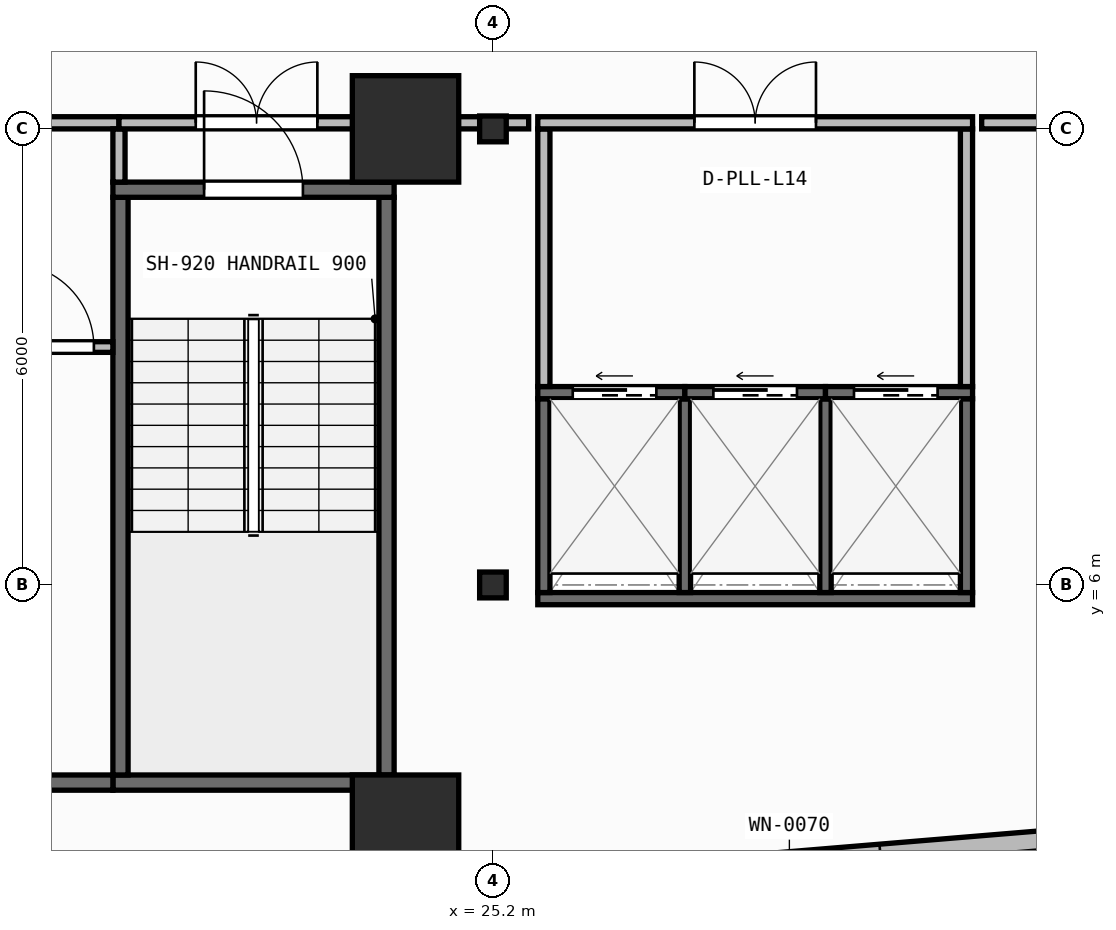
"""IFC4 building model, lengths in metres.
Left out: names, types, materials, properties, quantities, classifications, styles, units other than length and angle.
Written with IfcOpenShell. Run it as: python <this file> out.ifc"""

import sys

from ifc_helpers import new_model, si_unit, direction, frame, frame_2d, origin, origin_2d, place, context, subcontext, project, spatial, rectangle, i_section, extrude, element, fill, save


model = new_model("IFC4")
c1 = context("Model", 3, precision=1e-05, world=origin(), true_north=direction((0.0, 1.0)))
c2 = subcontext(c1, "Body", "Model", "MODEL_VIEW")
j1 = project(units=[si_unit("LENGTHUNIT", "METRE"), si_unit("PLANEANGLEUNIT", "RADIAN")], contexts=[c1])
p1 = place(None, origin())
s1 = spatial("IfcSite", under=j1, at=p1, CompositionType="ELEMENT")
p2 = place(p1, origin())
s2 = spatial("IfcBuilding", under=s1, at=p2, CompositionType="ELEMENT")
p3 = place(p2, frame((0.0, 0.0, 58.05)))
s3 = spatial("IfcBuildingStorey", under=s2, at=p3, CompositionType="ELEMENT", Elevation=58.05)
p4 = place(p3, frame((24.05, 2.8, 0.0), z_axis=(0.0, 0.0, 1.0), x_axis=(1.0, 0.0, 0.0)))
e1 = element("IfcColumn", 1, at=p4, inside=s3, PredefinedType="COLUMN", context=c2, shape_type="SweptSolid", body=[
    extrude(rectangle(XDim=1.4, YDim=1.4, at=origin_2d()), origin(), (0.0, 0.0, 1.0), 3.95),
])
p5 = place(p3, frame((25.2, 6.0, 0.0), z_axis=(0.0, 0.0, 1.0), x_axis=(1.0, 0.0, 0.0)))
e2 = element("IfcColumn", 2, at=p5, inside=s3, PredefinedType="COLUMN", context=c2, shape_type="SweptSolid", body=[
    extrude(i_section(OverallWidth=0.35, OverallDepth=0.34, WebThickness=0.016, FlangeThickness=0.028, at=origin_2d()), origin(), (0.0, 0.0, 1.0), 3.95),
])
p6 = place(p3, frame((24.05, 12.0, 0.0), z_axis=(0.0, 0.0, 1.0), x_axis=(1.0, 0.0, 0.0)))
e3 = element("IfcColumn", 3, at=p6, inside=s3, PredefinedType="COLUMN", context=c2, shape_type="SweptSolid", body=[
    extrude(rectangle(XDim=1.4, YDim=1.4, at=origin_2d()), origin(), (0.0, 0.0, 1.0), 3.95),
])
p7 = place(p3, frame((25.2, 12.0, 0.0), z_axis=(0.0, 0.0, 1.0), x_axis=(1.0, 0.0, 0.0)))
e4 = element("IfcColumn", 4, at=p7, inside=s3, PredefinedType="COLUMN", context=c2, shape_type="SweptSolid", body=[
    extrude(i_section(OverallWidth=0.35, OverallDepth=0.34, WebThickness=0.016, FlangeThickness=0.028, at=origin_2d()), origin(), (0.0, 0.0, 1.0), 3.95),
])
p8 = place(p3, frame((2.76, 0.174, 0.0), z_axis=(0.0, 0.0, 1.0), x_axis=(0.996571478456, 0.082736257641, 0.0)))
e5 = element("IfcWall", 5, at=p8, inside=s3, PredefinedType="STANDARD", context=c2, shape_type="SweptSolid", body=[
    extrude(rectangle(XDim=52.861, YDim=0.26, at=frame_2d((26.431, 0.0))), origin(), (0.0, 0.0, 1.0), 3.71),
])
p9 = place(p8, frame((25.231, 0.0, 0.9)))
e6 = element("IfcOpeningElement", 6, at=p9, cuts=e5, PredefinedType="OPENING", context=c2, shape_type="SweptSolid", body=[
    extrude(rectangle(XDim=2.4, YDim=1.65, at=frame_2d((1.2, 0.825))), frame((0.0, 0.14, 0.0), z_axis=(0.0, -1.0, 0.0), x_axis=(1.0, 0.0, 0.0)), (0.0, 0.0, 1.0), 0.28),
])
p10 = place(p3, frame((20.2, 3.4, 0.0), z_axis=(0.0, 0.0, 1.0), x_axis=(1.0, 0.0, 0.0)))
e7 = element("IfcWall", 7, at=p10, inside=s3, PredefinedType="SHEAR", context=c2, shape_type="SweptSolid", body=[
    extrude(rectangle(XDim=3.7, YDim=0.2, at=frame_2d((1.85, 0.0))), origin(), (0.0, 0.0, 1.0), 3.71),
])
for number, where, z_axis, x_axis in (
    (8, (20.3, 3.5, 0.0), (0.0, 0.0, 1.0), (0.0, 1.0, 0.0)),
    (9, (23.8, 3.5, 0.0), (0.0, 0.0, 1.0), (0.0, 1.0, 0.0)),
):
    element("IfcWall", number, at=place(p3, frame(where, z_axis=z_axis, x_axis=x_axis)), inside=s3, PredefinedType="SHEAR", context=c2, shape_type="SweptSolid", body=[
        extrude(rectangle(XDim=7.6, YDim=0.2, at=frame_2d((3.8, 0.0))), origin(), (0.0, 0.0, 1.0), 3.71),
    ])
p11 = place(p3, frame((20.2, 11.2, 0.0), z_axis=(0.0, 0.0, 1.0), x_axis=(1.0, 0.0, 0.0)))
e10 = element("IfcWall", 10, at=p11, inside=s3, PredefinedType="SHEAR", context=c2, shape_type="SweptSolid", body=[
    extrude(rectangle(XDim=3.7, YDim=0.2, at=frame_2d((1.85, 0.0))), origin(), (0.0, 0.0, 1.0), 3.71),
])
p12 = place(p11, frame((1.2, 0.0, 0.0)))
e11 = element("IfcOpeningElement", 11, at=p12, cuts=e10, PredefinedType="OPENING", context=c2, shape_type="SweptSolid", body=[
    extrude(rectangle(XDim=1.3, YDim=2.15, at=frame_2d((0.65, 1.075))), frame((0.0, 0.11, 0.0), z_axis=(0.0, -1.0, 0.0), x_axis=(1.0, 0.0, 0.0)), (0.0, 0.0, 1.0), 0.22),
])
p13 = place(p3, frame((6.5, 3.4, 0.0), z_axis=(0.0, 0.0, 1.0), x_axis=(1.0, 0.0, 0.0)))
e12 = element("IfcWall", 12, at=p13, inside=s3, PredefinedType="SHEAR", context=c2, shape_type="SweptSolid", body=[
    extrude(rectangle(XDim=13.7, YDim=0.2, at=frame_2d((6.85, 0.0))), origin(), (0.0, 0.0, 1.0), 3.71),
])
p14 = place(p3, frame((25.79, 5.82, 0.0), z_axis=(0.0, 0.0, 1.0), x_axis=(1.0, 0.0, 0.0)))
e13 = element("IfcWall", 13, at=p14, inside=s3, PredefinedType="SHEAR", context=c2, shape_type="SweptSolid", body=[
    extrude(rectangle(XDim=5.72, YDim=0.16, at=frame_2d((2.86, 0.0))), origin(), (0.0, 0.0, 1.0), 3.71),
])
for number, where, z_axis, x_axis in (
    (14, (25.87, 5.9, 0.0), (0.0, 0.0, 1.0), (0.0, 1.0, 0.0)),
    (15, (31.43, 5.9, 0.0), (0.0, 0.0, 1.0), (0.0, 1.0, 0.0)),
):
    element("IfcWall", number, at=place(p3, frame(where, z_axis=z_axis, x_axis=x_axis)), inside=s3, PredefinedType="SHEAR", context=c2, shape_type="SweptSolid", body=[
        extrude(rectangle(XDim=2.55, YDim=0.16, at=frame_2d((1.275, 0.0))), origin(), (0.0, 0.0, 1.0), 3.71),
    ])
for number, where, z_axis, x_axis in (
    (16, (27.725, 5.9, 0.0), (0.0, 0.0, 1.0), (0.0, 1.0, 0.0)),
    (17, (29.575, 5.9, 0.0), (0.0, 0.0, 1.0), (0.0, 1.0, 0.0)),
):
    element("IfcWall", number, at=place(p3, frame(where, z_axis=z_axis, x_axis=x_axis)), inside=s3, PredefinedType="SHEAR", context=c2, shape_type="SweptSolid", body=[
        extrude(rectangle(XDim=2.55, YDim=0.15, at=frame_2d((1.275, 0.0))), origin(), (0.0, 0.0, 1.0), 3.71),
    ])
p15 = place(p3, frame((25.79, 8.53, 0.0), z_axis=(0.0, 0.0, 1.0), x_axis=(1.0, 0.0, 0.0)))
e18 = element("IfcWall", 18, at=p15, inside=s3, PredefinedType="SHEAR", context=c2, shape_type="SweptSolid", body=[
    extrude(rectangle(XDim=1.935, YDim=0.16, at=frame_2d((0.968, 0.0))), origin(), (0.0, 0.0, 1.0), 3.71),
])
p16 = place(p15, frame((0.46, 0.0, 0.0)))
e19 = element("IfcOpeningElement", 19, at=p16, cuts=e18, PredefinedType="OPENING", context=c2, shape_type="SweptSolid", body=[
    extrude(rectangle(XDim=1.1, YDim=2.15, at=frame_2d((0.55, 1.075))), frame((0.0, 0.09, 0.0), z_axis=(0.0, -1.0, 0.0), x_axis=(1.0, 0.0, 0.0)), (0.0, 0.0, 1.0), 0.18),
])
p17 = place(p3, frame((27.725, 8.53, 0.0), z_axis=(0.0, 0.0, 1.0), x_axis=(1.0, 0.0, 0.0)))
e20 = element("IfcWall", 20, at=p17, inside=s3, PredefinedType="SHEAR", context=c2, shape_type="SweptSolid", body=[
    extrude(rectangle(XDim=1.85, YDim=0.16, at=frame_2d((0.925, 0.0))), origin(), (0.0, 0.0, 1.0), 3.71),
])
p18 = place(p17, frame((0.375, 0.0, 0.0)))
e21 = element("IfcOpeningElement", 21, at=p18, cuts=e20, PredefinedType="OPENING", context=c2, shape_type="SweptSolid", body=[
    extrude(rectangle(XDim=1.1, YDim=2.15, at=frame_2d((0.55, 1.075))), frame((0.0, 0.09, 0.0), z_axis=(0.0, -1.0, 0.0), x_axis=(1.0, 0.0, 0.0)), (0.0, 0.0, 1.0), 0.18),
])
p19 = place(p3, frame((29.575, 8.53, 0.0), z_axis=(0.0, 0.0, 1.0), x_axis=(1.0, 0.0, 0.0)))
e22 = element("IfcWall", 22, at=p19, inside=s3, PredefinedType="SHEAR", context=c2, shape_type="SweptSolid", body=[
    extrude(rectangle(XDim=1.935, YDim=0.16, at=frame_2d((0.968, 0.0))), origin(), (0.0, 0.0, 1.0), 3.71),
])
p20 = place(p19, frame((0.375, 0.0, 0.0)))
e23 = element("IfcOpeningElement", 23, at=p20, cuts=e22, PredefinedType="OPENING", context=c2, shape_type="SweptSolid", body=[
    extrude(rectangle(XDim=1.1, YDim=2.15, at=frame_2d((0.55, 1.075))), frame((0.0, 0.09, 0.0), z_axis=(0.0, -1.0, 0.0), x_axis=(1.0, 0.0, 0.0)), (0.0, 0.0, 1.0), 0.18),
])
p21 = place(p3, frame((18.61, 9.13, 0.0), z_axis=(0.0, 0.0, 1.0), x_axis=(1.0, 0.0, 0.0)))
e24 = element("IfcWall", 24, at=p21, inside=s3, PredefinedType="PARTITIONING", context=c2, shape_type="SweptSolid", body=[
    extrude(rectangle(XDim=1.59, YDim=0.14, at=frame_2d((0.795, 0.0))), origin(), (0.0, 0.0, 1.0), 3.71),
])
p22 = place(p21, frame((0.24, 0.0, 0.0)))
e25 = element("IfcOpeningElement", 25, at=p22, cuts=e24, PredefinedType="OPENING", context=c2, shape_type="SweptSolid", body=[
    extrude(rectangle(XDim=1.1, YDim=2.1, at=frame_2d((0.55, 1.05))), frame((0.0, 0.08, 0.0), z_axis=(0.0, -1.0, 0.0), x_axis=(1.0, 0.0, 0.0)), (0.0, 0.0, 1.0), 0.16),
])
p23 = place(p3, frame((12.58, 12.08, 0.0), z_axis=(0.0, 0.0, 1.0), x_axis=(1.0, 0.0, 0.0)))
e26 = element("IfcWall", 26, at=p23, inside=s3, PredefinedType="PARTITIONING", context=c2, shape_type="SweptSolid", body=[
    extrude(rectangle(XDim=7.7, YDim=0.16, at=frame_2d((3.85, 0.0))), origin(), (0.0, 0.0, 1.0), 3.073),
])
p24 = place(p23, frame((3.05, 0.0, 0.0)))
e27 = element("IfcOpeningElement", 27, at=p24, cuts=e26, PredefinedType="OPENING", context=c2, shape_type="SweptSolid", body=[
    extrude(rectangle(XDim=1.6, YDim=2.05, at=frame_2d((0.8, 1.025))), frame((0.0, 0.09, 0.0), z_axis=(0.0, -1.0, 0.0), x_axis=(1.0, 0.0, 0.0)), (0.0, 0.0, 1.0), 0.18),
])
p25 = place(p3, frame((20.28, 11.3, 0.0), z_axis=(0.0, 0.0, 1.0), x_axis=(0.0, 1.0, 0.0)))
e28 = element("IfcWall", 28, at=p25, inside=s3, PredefinedType="PARTITIONING", context=c2, shape_type="SweptSolid", body=[
    extrude(rectangle(XDim=0.7, YDim=0.16, at=frame_2d((0.35, 0.0))), origin(), (0.0, 0.0, 1.0), 3.71),
])
p26 = place(p3, frame((20.28, 12.08, 0.0), z_axis=(0.0, 0.0, 1.0), x_axis=(1.0, 0.0, 0.0)))
e29 = element("IfcWall", 29, at=p26, inside=s3, PredefinedType="PARTITIONING", context=c2, shape_type="SweptSolid", body=[
    extrude(rectangle(XDim=3.62, YDim=0.16, at=frame_2d((1.81, 0.0))), origin(), (0.0, 0.0, 1.0), 3.073),
])
p27 = place(p26, frame((1.01, 0.0, 0.0)))
e30 = element("IfcOpeningElement", 30, at=p27, cuts=e29, PredefinedType="OPENING", context=c2, shape_type="SweptSolid", body=[
    extrude(rectangle(XDim=1.6, YDim=2.05, at=frame_2d((0.8, 1.025))), frame((0.0, 0.09, 0.0), z_axis=(0.0, -1.0, 0.0), x_axis=(1.0, 0.0, 0.0)), (0.0, 0.0, 1.0), 0.18),
])
p28 = place(p3, frame((23.82, 11.3, 0.0), z_axis=(0.0, 0.0, 1.0), x_axis=(0.0, 1.0, 0.0)))
e31 = element("IfcWall", 31, at=p28, inside=s3, PredefinedType="PARTITIONING", context=c2, shape_type="SweptSolid", body=[
    extrude(rectangle(XDim=0.7, YDim=0.16, at=frame_2d((0.35, 0.0))), origin(), (0.0, 0.0, 1.0), 3.71),
])
for number, where, z_axis, x_axis in (
    (32, (25.87, 8.61, 0.0), (0.0, 0.0, 1.0), (0.0, 1.0, 0.0)),
    (33, (31.43, 8.61, 0.0), (0.0, 0.0, 1.0), (0.0, 1.0, 0.0)),
):
    element("IfcWall", number, at=place(p3, frame(where, z_axis=z_axis, x_axis=x_axis)), inside=s3, PredefinedType="PARTITIONING", context=c2, shape_type="SweptSolid", body=[
        extrude(rectangle(XDim=3.39, YDim=0.16, at=frame_2d((1.695, 0.0))), origin(), (0.0, 0.0, 1.0), 3.71),
    ])
p29 = place(p3, frame((25.79, 12.08, 0.0), z_axis=(0.0, 0.0, 1.0), x_axis=(1.0, 0.0, 0.0)))
e34 = element("IfcWall", 34, at=p29, inside=s3, PredefinedType="PARTITIONING", context=c2, shape_type="SweptSolid", body=[
    extrude(rectangle(XDim=5.72, YDim=0.16, at=frame_2d((2.86, 0.0))), origin(), (0.0, 0.0, 1.0), 3.073),
])
p30 = place(p29, frame((2.06, 0.0, 0.0)))
e35 = element("IfcOpeningElement", 35, at=p30, cuts=e34, PredefinedType="OPENING", context=c2, shape_type="SweptSolid", body=[
    extrude(rectangle(XDim=1.6, YDim=2.05, at=frame_2d((0.8, 1.025))), frame((0.0, 0.09, 0.0), z_axis=(0.0, -1.0, 0.0), x_axis=(1.0, 0.0, 0.0)), (0.0, 0.0, 1.0), 0.18),
])
p31 = place(p3, frame((24.02, 12.08, 0.0), z_axis=(0.0, 0.0, 1.0), x_axis=(1.0, 0.0, 0.0)))
e36 = element("IfcWall", 36, at=p31, inside=s3, PredefinedType="PARTITIONING", context=c2, shape_type="SweptSolid", body=[
    extrude(rectangle(XDim=1.65, YDim=0.16, at=frame_2d((0.825, 0.0))), origin(), (0.0, 0.0, 1.0), 3.073),
])
p32 = place(p3, frame((31.63, 12.08, 0.0), z_axis=(0.0, 0.0, 1.0), x_axis=(1.0, 0.0, 0.0)))
e37 = element("IfcWall", 37, at=p32, inside=s3, PredefinedType="PARTITIONING", context=c2, shape_type="SweptSolid", body=[
    extrude(rectangle(XDim=11.181, YDim=0.16, at=frame_2d((5.59, 0.0))), origin(), (0.0, 0.0, 1.0), 3.073),
])
p33 = place(p12, origin())
e38 = element("IfcDoor", 38, at=p33, inside=s3, OperationType="SINGLE_SWING_LEFT", PredefinedType="DOOR", context=c2, shape_type="SweptSolid", body=[
    extrude(rectangle(XDim=1.3, YDim=2.15, at=frame_2d((0.65, 1.075))), frame((0.0, 0.025, 0.0), z_axis=(0.0, -1.0, 0.0), x_axis=(1.0, 0.0, 0.0)), (0.0, 0.0, 1.0), 0.05),
])
fill(e11, e38)
p34 = place(p16, origin())
e39 = element("IfcDoor", 39, at=p34, inside=s3, OperationType="SLIDING_TO_LEFT", PredefinedType="DOOR", context=c2, shape_type="SweptSolid", body=[
    extrude(rectangle(XDim=1.1, YDim=2.15, at=frame_2d((0.55, 1.075))), frame((0.0, 0.025, 0.0), z_axis=(0.0, -1.0, 0.0), x_axis=(1.0, 0.0, 0.0)), (0.0, 0.0, 1.0), 0.05),
])
fill(e19, e39)
p35 = place(p18, origin())
e40 = element("IfcDoor", 40, at=p35, inside=s3, OperationType="SLIDING_TO_LEFT", PredefinedType="DOOR", context=c2, shape_type="SweptSolid", body=[
    extrude(rectangle(XDim=1.1, YDim=2.15, at=frame_2d((0.55, 1.075))), frame((0.0, 0.025, 0.0), z_axis=(0.0, -1.0, 0.0), x_axis=(1.0, 0.0, 0.0)), (0.0, 0.0, 1.0), 0.05),
])
fill(e21, e40)
p36 = place(p20, origin())
e41 = element("IfcDoor", 41, at=p36, inside=s3, OperationType="SLIDING_TO_LEFT", PredefinedType="DOOR", context=c2, shape_type="SweptSolid", body=[
    extrude(rectangle(XDim=1.1, YDim=2.15, at=frame_2d((0.55, 1.075))), frame((0.0, 0.025, 0.0), z_axis=(0.0, -1.0, 0.0), x_axis=(1.0, 0.0, 0.0)), (0.0, 0.0, 1.0), 0.05),
])
fill(e23, e41)
p37 = place(p22, origin())
e42 = element("IfcDoor", 42, at=p37, inside=s3, OperationType="SINGLE_SWING_LEFT", PredefinedType="DOOR", context=c2, shape_type="SweptSolid", body=[
    extrude(rectangle(XDim=1.1, YDim=2.1, at=frame_2d((0.55, 1.05))), frame((0.0, 0.025, 0.0), z_axis=(0.0, -1.0, 0.0), x_axis=(1.0, 0.0, 0.0)), (0.0, 0.0, 1.0), 0.05),
])
fill(e25, e42)
p38 = place(p27, origin())
e43 = element("IfcDoor", 43, at=p38, inside=s3, OperationType="DOUBLE_DOOR_SINGLE_SWING", PredefinedType="DOOR", context=c2, shape_type="SweptSolid", body=[
    extrude(rectangle(XDim=1.6, YDim=2.05, at=frame_2d((0.8, 1.025))), frame((0.0, 0.025, 0.0), z_axis=(0.0, -1.0, 0.0), x_axis=(1.0, 0.0, 0.0)), (0.0, 0.0, 1.0), 0.05),
])
fill(e30, e43)
p39 = place(p30, origin())
e44 = element("IfcDoor", 44, at=p39, inside=s3, OperationType="DOUBLE_DOOR_SINGLE_SWING", PredefinedType="DOOR", context=c2, shape_type="SweptSolid", body=[
    extrude(rectangle(XDim=1.6, YDim=2.05, at=frame_2d((0.8, 1.025))), frame((0.0, 0.025, 0.0), z_axis=(0.0, -1.0, 0.0), x_axis=(1.0, 0.0, 0.0)), (0.0, 0.0, 1.0), 0.05),
])
fill(e35, e44)
save(model, sys.argv[1])
